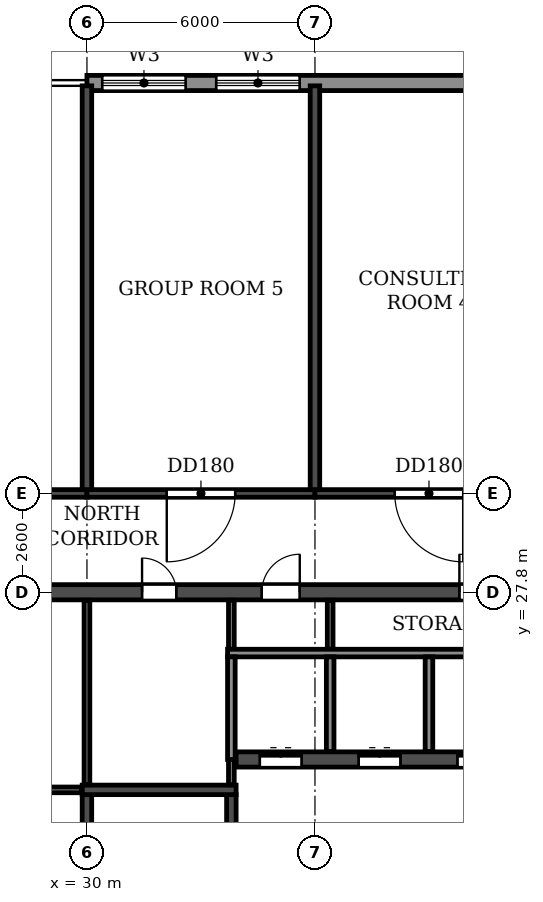
"""IFC4 building model, lengths in metres.
Left out: names, types, materials, properties, quantities, classifications, styles, units other than length and angle.
Written with IfcOpenShell. Run it as: python <this file> out.ifc"""

import sys

from ifc_helpers import new_model, si_unit, direction, frame, frame_2d, origin, place, context, subcontext, project, spatial, rectangle, extrude, element, fill, save


model = new_model("IFC4")
c1 = context("Model", 3, precision=1e-05, world=origin(), true_north=direction((0.0, 1.0)))
c2 = subcontext(c1, "Body", "Model", "MODEL_VIEW")
j1 = project(units=[si_unit("LENGTHUNIT", "METRE"), si_unit("PLANEANGLEUNIT", "RADIAN")], contexts=[c1])
p1 = place(None, origin())
s1 = spatial("IfcSite", under=j1, at=p1, CompositionType="ELEMENT")
p2 = place(p1, origin())
s2 = spatial("IfcBuilding", under=s1, at=p2, CompositionType="ELEMENT")
p3 = place(p2, frame((0.0, 0.0, 211.5)))
s3 = spatial("IfcBuildingStorey", under=s2, at=p3, CompositionType="ELEMENT", Elevation=211.5)
for number, where, z_axis, x_axis in (
    (1, (30.0, 30.5, 0.0), (0.0, 0.0, 1.0), (0.0, 1.0, 0.0)),
    (2, (36.0, 30.5, 0.0), (0.0, 0.0, 1.0), (0.0, 1.0, 0.0)),
):
    element("IfcWall", number, at=place(p3, frame(where, z_axis=z_axis, x_axis=x_axis)), inside=s3, PredefinedType="SHEAR", context=c2, shape_type="SweptSolid", body=[
        extrude(rectangle(XDim=10.625, YDim=0.25, at=frame_2d((5.312, 0.0))), origin(), (0.0, 0.0, 1.0), 2.95),
    ])
p4 = place(p3, frame((24.0, 30.4, 0.0), z_axis=(0.0, 0.0, 1.0), x_axis=(1.0, 0.0, 0.0)))
e3 = element("IfcWall", 3, at=p4, inside=s3, PredefinedType="SHEAR", context=c2, shape_type="SweptSolid", body=[
    extrude(rectangle(XDim=6.0, YDim=0.2, at=frame_2d((3.0, 0.0))), origin(), (0.0, 0.0, 1.0), 2.35),
])
p5 = place(p4, frame((2.1, 0.0, 0.0)))
e4 = element("IfcOpeningElement", 4, at=p5, cuts=e3, PredefinedType="OPENING", context=c2, shape_type="SweptSolid", body=[
    extrude(rectangle(XDim=1.8, YDim=2.1, at=frame_2d((0.9, 1.05))), frame((0.0, 0.11, 0.0), z_axis=(0.0, -1.0, 0.0), x_axis=(1.0, 0.0, 0.0)), (0.0, 0.0, 1.0), 0.22),
])
p6 = place(p3, frame((30.0, 30.4, 0.0), z_axis=(0.0, 0.0, 1.0), x_axis=(1.0, 0.0, 0.0)))
e5 = element("IfcWall", 5, at=p6, inside=s3, PredefinedType="SHEAR", context=c2, shape_type="SweptSolid", body=[
    extrude(rectangle(XDim=6.0, YDim=0.2, at=frame_2d((3.0, 0.0))), origin(), (0.0, 0.0, 1.0), 2.35),
])
p7 = place(p6, frame((2.1, 0.0, 0.0)))
e6 = element("IfcOpeningElement", 6, at=p7, cuts=e5, PredefinedType="OPENING", context=c2, shape_type="SweptSolid", body=[
    extrude(rectangle(XDim=1.8, YDim=2.1, at=frame_2d((0.9, 1.05))), frame((0.0, 0.11, 0.0), z_axis=(0.0, -1.0, 0.0), x_axis=(1.0, 0.0, 0.0)), (0.0, 0.0, 1.0), 0.22),
])
p8 = place(p3, frame((36.0, 30.4, 0.0), z_axis=(0.0, 0.0, 1.0), x_axis=(1.0, 0.0, 0.0)))
e7 = element("IfcWall", 7, at=p8, inside=s3, PredefinedType="SHEAR", context=c2, shape_type="SweptSolid", body=[
    extrude(rectangle(XDim=6.0, YDim=0.2, at=frame_2d((3.0, 0.0))), origin(), (0.0, 0.0, 1.0), 2.35),
])
p9 = place(p8, frame((2.1, 0.0, 0.0)))
e8 = element("IfcOpeningElement", 8, at=p9, cuts=e7, PredefinedType="OPENING", context=c2, shape_type="SweptSolid", body=[
    extrude(rectangle(XDim=1.8, YDim=2.1, at=frame_2d((0.9, 1.05))), frame((0.0, 0.11, 0.0), z_axis=(0.0, -1.0, 0.0), x_axis=(1.0, 0.0, 0.0)), (0.0, 0.0, 1.0), 0.22),
])
p10 = place(p3, frame((18.2, 27.8, 0.0), z_axis=(0.0, 0.0, 1.0), x_axis=(1.0, 0.0, 0.0)))
e9 = element("IfcWall", 9, at=p10, inside=s3, PredefinedType="SOLIDWALL", context=c2, shape_type="SweptSolid", body=[
    extrude(rectangle(XDim=65.6, YDim=0.4, at=frame_2d((32.8, 0.0))), origin(), (0.0, 0.0, 1.0), 2.95),
])
p11 = place(p10, frame((0.7, 0.0, 0.0)))
e10 = element("IfcOpeningElement", 10, at=p11, cuts=e9, PredefinedType="OPENING", context=c2, shape_type="SweptSolid", body=[
    extrude(rectangle(XDim=1.0, YDim=2.1, at=frame_2d((0.5, 1.05))), frame((0.0, 0.21, 0.0), z_axis=(0.0, -1.0, 0.0), x_axis=(1.0, 0.0, 0.0)), (0.0, 0.0, 1.0), 0.42),
])
p12 = place(p10, frame((4.05, 0.0, 0.0)))
e11 = element("IfcOpeningElement", 11, at=p12, cuts=e9, PredefinedType="OPENING", context=c2, shape_type="SweptSolid", body=[
    extrude(rectangle(XDim=0.9, YDim=2.1, at=frame_2d((0.45, 1.05))), frame((0.0, 0.21, 0.0), z_axis=(0.0, -1.0, 0.0), x_axis=(1.0, 0.0, 0.0)), (0.0, 0.0, 1.0), 0.42),
])
p13 = place(p10, frame((8.65, 0.0, 0.0)))
e12 = element("IfcOpeningElement", 12, at=p13, cuts=e9, PredefinedType="OPENING", context=c2, shape_type="SweptSolid", body=[
    extrude(rectangle(XDim=0.9, YDim=2.1, at=frame_2d((0.45, 1.05))), frame((0.0, 0.21, 0.0), z_axis=(0.0, -1.0, 0.0), x_axis=(1.0, 0.0, 0.0)), (0.0, 0.0, 1.0), 0.42),
])
p14 = place(p10, frame((13.25, 0.0, 0.0)))
e13 = element("IfcOpeningElement", 13, at=p14, cuts=e9, PredefinedType="OPENING", context=c2, shape_type="SweptSolid", body=[
    extrude(rectangle(XDim=0.9, YDim=2.1, at=frame_2d((0.45, 1.05))), frame((0.0, 0.21, 0.0), z_axis=(0.0, -1.0, 0.0), x_axis=(1.0, 0.0, 0.0)), (0.0, 0.0, 1.0), 0.42),
])
p15 = place(p10, frame((16.4, 0.0, 0.0)))
e14 = element("IfcOpeningElement", 14, at=p15, cuts=e9, PredefinedType="OPENING", context=c2, shape_type="SweptSolid", body=[
    extrude(rectangle(XDim=1.0, YDim=2.1, at=frame_2d((0.5, 1.05))), frame((0.0, 0.21, 0.0), z_axis=(0.0, -1.0, 0.0), x_axis=(1.0, 0.0, 0.0)), (0.0, 0.0, 1.0), 0.42),
])
p16 = place(p10, frame((21.6, 0.0, 0.0)))
e15 = element("IfcOpeningElement", 15, at=p16, cuts=e9, PredefinedType="OPENING", context=c2, shape_type="SweptSolid", body=[
    extrude(rectangle(XDim=1.0, YDim=2.1, at=frame_2d((0.5, 1.05))), frame((0.0, 0.21, 0.0), z_axis=(0.0, -1.0, 0.0), x_axis=(1.0, 0.0, 0.0)), (0.0, 0.0, 1.0), 0.42),
])
p17 = place(p10, frame((29.4, 0.0, 0.0)))
e16 = element("IfcOpeningElement", 16, at=p17, cuts=e9, PredefinedType="OPENING", context=c2, shape_type="SweptSolid", body=[
    extrude(rectangle(XDim=1.0, YDim=2.1, at=frame_2d((0.5, 1.05))), frame((0.0, 0.21, 0.0), z_axis=(0.0, -1.0, 0.0), x_axis=(1.0, 0.0, 0.0)), (0.0, 0.0, 1.0), 0.42),
])
p18 = place(p10, frame((32.3, 0.0, 0.0)))
e17 = element("IfcOpeningElement", 17, at=p18, cuts=e9, PredefinedType="OPENING", context=c2, shape_type="SweptSolid", body=[
    extrude(rectangle(XDim=1.0, YDim=2.1, at=frame_2d((0.5, 1.05))), frame((0.0, 0.21, 0.0), z_axis=(0.0, -1.0, 0.0), x_axis=(1.0, 0.0, 0.0)), (0.0, 0.0, 1.0), 0.42),
])
p19 = place(p10, frame((36.25, 0.0, 0.0)))
e18 = element("IfcOpeningElement", 18, at=p19, cuts=e9, PredefinedType="OPENING", context=c2, shape_type="SweptSolid", body=[
    extrude(rectangle(XDim=1.5, YDim=2.1, at=frame_2d((0.75, 1.05))), frame((0.0, 0.21, 0.0), z_axis=(0.0, -1.0, 0.0), x_axis=(1.0, 0.0, 0.0)), (0.0, 0.0, 1.0), 0.42),
])
p20 = place(p10, frame((41.7, 0.0, 0.0)))
e19 = element("IfcOpeningElement", 19, at=p20, cuts=e9, PredefinedType="OPENING", context=c2, shape_type="SweptSolid", body=[
    extrude(rectangle(XDim=1.0, YDim=2.1, at=frame_2d((0.5, 1.05))), frame((0.0, 0.21, 0.0), z_axis=(0.0, -1.0, 0.0), x_axis=(1.0, 0.0, 0.0)), (0.0, 0.0, 1.0), 0.42),
])
p21 = place(p10, frame((45.6, 0.0, 0.0)))
e20 = element("IfcOpeningElement", 20, at=p21, cuts=e9, PredefinedType="OPENING", context=c2, shape_type="SweptSolid", body=[
    extrude(rectangle(XDim=1.0, YDim=2.1, at=frame_2d((0.5, 1.05))), frame((0.0, 0.21, 0.0), z_axis=(0.0, -1.0, 0.0), x_axis=(1.0, 0.0, 0.0)), (0.0, 0.0, 1.0), 0.42),
])
p22 = place(p10, frame((48.2, 0.0, 0.0)))
e21 = element("IfcOpeningElement", 21, at=p22, cuts=e9, PredefinedType="OPENING", context=c2, shape_type="SweptSolid", body=[
    extrude(rectangle(XDim=1.0, YDim=2.1, at=frame_2d((0.5, 1.05))), frame((0.0, 0.21, 0.0), z_axis=(0.0, -1.0, 0.0), x_axis=(1.0, 0.0, 0.0)), (0.0, 0.0, 1.0), 0.42),
])
p23 = place(p10, frame((51.45, 0.0, 0.0)))
e22 = element("IfcOpeningElement", 22, at=p23, cuts=e9, PredefinedType="OPENING", context=c2, shape_type="SweptSolid", body=[
    extrude(rectangle(XDim=0.9, YDim=2.1, at=frame_2d((0.45, 1.05))), frame((0.0, 0.21, 0.0), z_axis=(0.0, -1.0, 0.0), x_axis=(1.0, 0.0, 0.0)), (0.0, 0.0, 1.0), 0.42),
])
p24 = place(p10, frame((56.05, 0.0, 0.0)))
e23 = element("IfcOpeningElement", 23, at=p24, cuts=e9, PredefinedType="OPENING", context=c2, shape_type="SweptSolid", body=[
    extrude(rectangle(XDim=0.9, YDim=2.1, at=frame_2d((0.45, 1.05))), frame((0.0, 0.21, 0.0), z_axis=(0.0, -1.0, 0.0), x_axis=(1.0, 0.0, 0.0)), (0.0, 0.0, 1.0), 0.42),
])
p25 = place(p10, frame((60.65, 0.0, 0.0)))
e24 = element("IfcOpeningElement", 24, at=p25, cuts=e9, PredefinedType="OPENING", context=c2, shape_type="SweptSolid", body=[
    extrude(rectangle(XDim=0.9, YDim=2.1, at=frame_2d((0.45, 1.05))), frame((0.0, 0.21, 0.0), z_axis=(0.0, -1.0, 0.0), x_axis=(1.0, 0.0, 0.0)), (0.0, 0.0, 1.0), 0.42),
])
p26 = place(p10, frame((63.9, 0.0, 0.0)))
e25 = element("IfcOpeningElement", 25, at=p26, cuts=e9, PredefinedType="OPENING", context=c2, shape_type="SweptSolid", body=[
    extrude(rectangle(XDim=1.0, YDim=2.1, at=frame_2d((0.5, 1.05))), frame((0.0, 0.21, 0.0), z_axis=(0.0, -1.0, 0.0), x_axis=(1.0, 0.0, 0.0)), (0.0, 0.0, 1.0), 0.42),
])
p27 = place(p3, frame((33.925, 23.4, 0.0), z_axis=(0.0, 0.0, 1.0), x_axis=(1.0, 0.0, 0.0)))
e26 = element("IfcWall", 26, at=p27, inside=s3, PredefinedType="SOLIDWALL", context=c2, shape_type="SweptSolid", body=[
    extrude(rectangle(XDim=34.15, YDim=0.4, at=frame_2d((17.075, 0.0))), origin(), (0.0, 0.0, 1.0), 2.95),
])
p28 = place(p27, frame((16.175, 0.0, 0.0)))
e27 = element("IfcOpeningElement", 27, at=p28, cuts=e26, PredefinedType="OPENING", context=c2, shape_type="SweptSolid", body=[
    extrude(rectangle(XDim=1.8, YDim=2.1, at=frame_2d((0.9, 1.05))), frame((0.0, 0.21, 0.0), z_axis=(0.0, -1.0, 0.0), x_axis=(1.0, 0.0, 0.0)), (0.0, 0.0, 1.0), 0.42),
])
p29 = place(p27, frame((0.625, 0.0, 0.0)))
e28 = element("IfcOpeningElement", 28, at=p29, cuts=e26, PredefinedType="OPENING", context=c2, shape_type="SweptSolid", body=[
    extrude(rectangle(XDim=1.1, YDim=2.1, at=frame_2d((0.55, 1.05))), frame((0.0, 0.21, 0.0), z_axis=(0.0, -1.0, 0.0), x_axis=(1.0, 0.0, 0.0)), (0.0, 0.0, 1.0), 0.42),
])
p30 = place(p27, frame((3.225, 0.0, 0.0)))
e29 = element("IfcOpeningElement", 29, at=p30, cuts=e26, PredefinedType="OPENING", context=c2, shape_type="SweptSolid", body=[
    extrude(rectangle(XDim=1.1, YDim=2.1, at=frame_2d((0.55, 1.05))), frame((0.0, 0.21, 0.0), z_axis=(0.0, -1.0, 0.0), x_axis=(1.0, 0.0, 0.0)), (0.0, 0.0, 1.0), 0.42),
])
p31 = place(p27, frame((5.825, 0.0, 0.0)))
e30 = element("IfcOpeningElement", 30, at=p31, cuts=e26, PredefinedType="OPENING", context=c2, shape_type="SweptSolid", body=[
    extrude(rectangle(XDim=1.1, YDim=2.1, at=frame_2d((0.55, 1.05))), frame((0.0, 0.21, 0.0), z_axis=(0.0, -1.0, 0.0), x_axis=(1.0, 0.0, 0.0)), (0.0, 0.0, 1.0), 0.42),
])
p32 = place(p27, frame((8.425, 0.0, 0.0)))
e31 = element("IfcOpeningElement", 31, at=p32, cuts=e26, PredefinedType="OPENING", context=c2, shape_type="SweptSolid", body=[
    extrude(rectangle(XDim=1.1, YDim=2.1, at=frame_2d((0.55, 1.05))), frame((0.0, 0.21, 0.0), z_axis=(0.0, -1.0, 0.0), x_axis=(1.0, 0.0, 0.0)), (0.0, 0.0, 1.0), 0.42),
])
p33 = place(p27, frame((11.025, 0.0, 0.0)))
e32 = element("IfcOpeningElement", 32, at=p33, cuts=e26, PredefinedType="OPENING", context=c2, shape_type="SweptSolid", body=[
    extrude(rectangle(XDim=1.1, YDim=2.1, at=frame_2d((0.55, 1.05))), frame((0.0, 0.21, 0.0), z_axis=(0.0, -1.0, 0.0), x_axis=(1.0, 0.0, 0.0)), (0.0, 0.0, 1.0), 0.42),
])
p34 = place(p27, frame((13.625, 0.0, 0.0)))
e33 = element("IfcOpeningElement", 33, at=p34, cuts=e26, PredefinedType="OPENING", context=c2, shape_type="SweptSolid", body=[
    extrude(rectangle(XDim=1.1, YDim=2.1, at=frame_2d((0.55, 1.05))), frame((0.0, 0.21, 0.0), z_axis=(0.0, -1.0, 0.0), x_axis=(1.0, 0.0, 0.0)), (0.0, 0.0, 1.0), 0.42),
])
p35 = place(p27, frame((27.225, 0.0, 0.0)))
e34 = element("IfcOpeningElement", 34, at=p35, cuts=e26, PredefinedType="OPENING", context=c2, shape_type="SweptSolid", body=[
    extrude(rectangle(XDim=1.1, YDim=2.1, at=frame_2d((0.55, 1.05))), frame((0.0, 0.21, 0.0), z_axis=(0.0, -1.0, 0.0), x_axis=(1.0, 0.0, 0.0)), (0.0, 0.0, 1.0), 0.42),
])
p36 = place(p3, frame((30.0, 14.8, 0.0), z_axis=(0.0, 0.0, 1.0), x_axis=(0.0, 1.0, 0.0)))
e35 = element("IfcWall", 35, at=p36, inside=s3, PredefinedType="SOLIDWALL", context=c2, shape_type="SweptSolid", body=[
    extrude(rectangle(XDim=7.675, YDim=0.25, at=frame_2d((3.837, 0.0))), origin(), (0.0, 0.0, 1.0), 2.95),
])
p37 = place(p3, frame((33.8, 14.8, 0.0), z_axis=(0.0, 0.0, 1.0), x_axis=(0.0, 1.0, 0.0)))
e36 = element("IfcWall", 36, at=p37, inside=s3, PredefinedType="SOLIDWALL", context=c2, shape_type="SweptSolid", body=[
    extrude(rectangle(XDim=7.675, YDim=0.25, at=frame_2d((3.837, 0.0))), origin(), (0.0, 0.0, 1.0), 2.95),
])
p38 = place(p37, frame((0.5, 0.0, 0.0)))
e37 = element("IfcOpeningElement", 37, at=p38, cuts=e36, PredefinedType="OPENING", context=c2, shape_type="SweptSolid", body=[
    extrude(rectangle(XDim=1.0, YDim=2.1, at=frame_2d((0.5, 1.05))), frame((0.0, 0.135, 0.0), z_axis=(0.0, -1.0, 0.0), x_axis=(1.0, 0.0, 0.0)), (0.0, 0.0, 1.0), 0.27),
])
p39 = place(p3, frame((29.875, 22.6, 0.0), z_axis=(0.0, 0.0, 1.0), x_axis=(1.0, 0.0, 0.0)))
e38 = element("IfcWall", 38, at=p39, inside=s3, PredefinedType="SOLIDWALL", context=c2, shape_type="SweptSolid", body=[
    extrude(rectangle(XDim=4.05, YDim=0.25, at=frame_2d((2.025, 0.0))), origin(), (0.0, 0.0, 1.0), 2.95),
])
p40 = place(p3, frame((66.0, 41.2, 0.0), z_axis=(0.0, 0.0, 1.0), x_axis=(-1.0, 0.0, 0.0)))
e39 = element("IfcWall", 39, at=p40, inside=s3, PredefinedType="STANDARD", context=c2, shape_type="SweptSolid", body=[
    extrude(rectangle(XDim=36.0, YDim=0.4, at=frame_2d((18.0, 0.0))), origin(), (0.0, 0.0, 1.0), 2.95),
])
p41 = place(p40, frame((33.4, 0.0, 0.6)))
e40 = element("IfcOpeningElement", 40, at=p41, cuts=e39, PredefinedType="OPENING", context=c2, shape_type="SweptSolid", body=[
    extrude(rectangle(XDim=2.2, YDim=1.8, at=frame_2d((1.1, 0.9))), frame((0.0, 0.21, 0.0), z_axis=(0.0, -1.0, 0.0), x_axis=(1.0, 0.0, 0.0)), (0.0, 0.0, 1.0), 0.42),
])
p42 = place(p40, frame((30.4, 0.0, 0.6)))
e41 = element("IfcOpeningElement", 41, at=p42, cuts=e39, PredefinedType="OPENING", context=c2, shape_type="SweptSolid", body=[
    extrude(rectangle(XDim=2.2, YDim=1.8, at=frame_2d((1.1, 0.9))), frame((0.0, 0.21, 0.0), z_axis=(0.0, -1.0, 0.0), x_axis=(1.0, 0.0, 0.0)), (0.0, 0.0, 1.0), 0.42),
])
p43 = place(p40, frame((21.4, 0.0, 0.6)))
e42 = element("IfcOpeningElement", 42, at=p43, cuts=e39, PredefinedType="OPENING", context=c2, shape_type="SweptSolid", body=[
    extrude(rectangle(XDim=2.2, YDim=1.8, at=frame_2d((1.1, 0.9))), frame((0.0, 0.21, 0.0), z_axis=(0.0, -1.0, 0.0), x_axis=(1.0, 0.0, 0.0)), (0.0, 0.0, 1.0), 0.42),
])
p44 = place(p40, frame((18.4, 0.0, 0.6)))
e43 = element("IfcOpeningElement", 43, at=p44, cuts=e39, PredefinedType="OPENING", context=c2, shape_type="SweptSolid", body=[
    extrude(rectangle(XDim=2.2, YDim=1.8, at=frame_2d((1.1, 0.9))), frame((0.0, 0.21, 0.0), z_axis=(0.0, -1.0, 0.0), x_axis=(1.0, 0.0, 0.0)), (0.0, 0.0, 1.0), 0.42),
])
p45 = place(p3, frame((24.735, 22.6, 0.0), z_axis=(0.0, 0.0, 1.0), x_axis=(1.0, 0.0, 0.0)))
e44 = element("IfcWall", 44, at=p45, inside=s3, PredefinedType="PARTITIONING", context=c2, shape_type="SweptSolid", body=[
    extrude(rectangle(XDim=5.13, YDim=0.15, at=frame_2d((2.565, 0.0))), origin(), (0.0, 0.0, 1.0), 2.95),
])
p46 = place(p3, frame((36.4, 26.3, 0.0), z_axis=(0.0, 0.0, 1.0), x_axis=(0.0, 1.0, 0.0)))
e45 = element("IfcWall", 45, at=p46, inside=s3, PredefinedType="PARTITIONING", context=c2, shape_type="SweptSolid", body=[
    extrude(rectangle(XDim=1.29, YDim=0.15, at=frame_2d((0.645, 0.0))), origin(), (0.0, 0.0, 1.0), 2.95),
])
p47 = place(p3, frame((30.0, 22.735, 0.0), z_axis=(0.0, 0.0, 1.0), x_axis=(0.0, 1.0, 0.0)))
e46 = element("IfcWall", 46, at=p47, inside=s3, PredefinedType="PARTITIONING", context=c2, shape_type="SweptSolid", body=[
    extrude(rectangle(XDim=4.855, YDim=0.15, at=frame_2d((2.427, 0.0))), origin(), (0.0, 0.0, 1.0), 2.95),
])
p48 = place(p3, frame((33.8, 22.735, 0.0), z_axis=(0.0, 0.0, 1.0), x_axis=(0.0, 1.0, 0.0)))
e47 = element("IfcWall", 47, at=p48, inside=s3, PredefinedType="PARTITIONING", context=c2, shape_type="SweptSolid", body=[
    extrude(rectangle(XDim=0.665, YDim=0.15, at=frame_2d((0.333, 0.0))), origin(), (0.0, 0.0, 1.0), 2.95),
])
p49 = place(p3, frame((33.8, 26.3, 0.0), z_axis=(0.0, 0.0, 1.0), x_axis=(0.0, 1.0, 0.0)))
e48 = element("IfcWall", 48, at=p49, inside=s3, PredefinedType="PARTITIONING", context=c2, shape_type="SweptSolid", body=[
    extrude(rectangle(XDim=1.29, YDim=0.15, at=frame_2d((0.645, 0.0))), origin(), (0.0, 0.0, 1.0), 2.95),
])
p50 = place(p3, frame((33.7, 26.2, 0.0), z_axis=(0.0, 0.0, 1.0), x_axis=(1.0, 0.0, 0.0)))
e49 = element("IfcWall", 49, at=p50, inside=s3, PredefinedType="PARTITIONING", context=c2, shape_type="SweptSolid", body=[
    extrude(rectangle(XDim=10.4, YDim=0.2, at=frame_2d((5.2, 0.0))), origin(), (0.0, 0.0, 1.0), 2.95),
])
p51 = place(p3, frame((33.8, 23.4, 0.0), z_axis=(0.0, 0.0, 1.0), x_axis=(0.0, 1.0, 0.0)))
e50 = element("IfcWall", 50, at=p51, inside=s3, PredefinedType="PARTITIONING", context=c2, shape_type="SweptSolid", body=[
    extrude(rectangle(XDim=2.7, YDim=0.2, at=frame_2d((1.35, 0.0))), origin(), (0.0, 0.0, 1.0), 2.95),
])
for number, where, z_axis, x_axis in (
    (51, (36.4, 23.61, 0.0), (0.0, 0.0, 1.0), (0.0, 1.0, 0.0)),
    (52, (39.0, 23.61, 0.0), (0.0, 0.0, 1.0), (0.0, 1.0, 0.0)),
):
    element("IfcWall", number, at=place(p3, frame(where, z_axis=z_axis, x_axis=x_axis)), inside=s3, PredefinedType="PARTITIONING", context=c2, shape_type="SweptSolid", body=[
        extrude(rectangle(XDim=2.49, YDim=0.2, at=frame_2d((1.245, 0.0))), origin(), (0.0, 0.0, 1.0), 2.95),
    ])
p52 = place(p41, origin())
e53 = element("IfcWindow", 53, at=p52, inside=s3, PartitioningType="DOUBLE_PANEL_HORIZONTAL", PredefinedType="WINDOW", context=c2, shape_type="SweptSolid", body=[
    extrude(rectangle(XDim=2.2, YDim=1.8, at=frame_2d((1.1, 0.9))), frame((0.0, 0.03, 0.0), z_axis=(0.0, -1.0, 0.0), x_axis=(1.0, 0.0, 0.0)), (0.0, 0.0, 1.0), 0.06),
])
fill(e40, e53)
p53 = place(p42, origin())
e54 = element("IfcWindow", 54, at=p53, inside=s3, PartitioningType="DOUBLE_PANEL_HORIZONTAL", PredefinedType="WINDOW", context=c2, shape_type="SweptSolid", body=[
    extrude(rectangle(XDim=2.2, YDim=1.8, at=frame_2d((1.1, 0.9))), frame((0.0, 0.03, 0.0), z_axis=(0.0, -1.0, 0.0), x_axis=(1.0, 0.0, 0.0)), (0.0, 0.0, 1.0), 0.06),
])
fill(e41, e54)
p54 = place(p14, origin())
e55 = element("IfcDoor", 55, at=p54, inside=s3, OperationType="SINGLE_SWING_LEFT", PredefinedType="DOOR", context=c2, shape_type="SweptSolid", body=[
    extrude(rectangle(XDim=0.9, YDim=2.1, at=frame_2d((0.45, 1.05))), frame((0.0, 0.025, 0.0), z_axis=(0.0, -1.0, 0.0), x_axis=(1.0, 0.0, 0.0)), (0.0, 0.0, 1.0), 0.05),
])
fill(e13, e55)
p55 = place(p7, frame((1.8, 0.0, 0.0), z_axis=(0.0, 0.0, 1.0), x_axis=(-1.0, 0.0, 0.0)))
e56 = element("IfcDoor", 56, at=p55, inside=s3, OperationType="DOUBLE_DOOR_SINGLE_SWING", PredefinedType="DOOR", context=c2, shape_type="SweptSolid", body=[
    extrude(rectangle(XDim=1.8, YDim=2.1, at=frame_2d((0.9, 1.05))), frame((0.0, 0.025, 0.0), z_axis=(0.0, -1.0, 0.0), x_axis=(1.0, 0.0, 0.0)), (0.0, 0.0, 1.0), 0.05),
])
fill(e6, e56)
p56 = place(p15, origin())
e57 = element("IfcDoor", 57, at=p56, inside=s3, OperationType="SINGLE_SWING_RIGHT", PredefinedType="DOOR", context=c2, shape_type="SweptSolid", body=[
    extrude(rectangle(XDim=1.0, YDim=2.1, at=frame_2d((0.5, 1.05))), frame((0.0, 0.025, 0.0), z_axis=(0.0, -1.0, 0.0), x_axis=(1.0, 0.0, 0.0)), (0.0, 0.0, 1.0), 0.05),
])
fill(e14, e57)
p57 = place(p9, frame((1.8, 0.0, 0.0), z_axis=(0.0, 0.0, 1.0), x_axis=(-1.0, 0.0, 0.0)))
e58 = element("IfcDoor", 58, at=p57, inside=s3, OperationType="DOUBLE_DOOR_SINGLE_SWING", PredefinedType="DOOR", context=c2, shape_type="SweptSolid", body=[
    extrude(rectangle(XDim=1.8, YDim=2.1, at=frame_2d((0.9, 1.05))), frame((0.0, 0.025, 0.0), z_axis=(0.0, -1.0, 0.0), x_axis=(1.0, 0.0, 0.0)), (0.0, 0.0, 1.0), 0.05),
])
fill(e8, e58)
p58 = place(p16, origin())
e59 = element("IfcDoor", 59, at=p58, inside=s3, OperationType="SINGLE_SWING_LEFT", PredefinedType="DOOR", context=c2, shape_type="SweptSolid", body=[
    extrude(rectangle(XDim=1.0, YDim=2.1, at=frame_2d((0.5, 1.05))), frame((0.0, 0.025, 0.0), z_axis=(0.0, -1.0, 0.0), x_axis=(1.0, 0.0, 0.0)), (0.0, 0.0, 1.0), 0.05),
])
fill(e15, e59)
p59 = place(p29, origin())
e60 = element("IfcDoor", 60, at=p59, inside=s3, OperationType="DOUBLE_DOOR_SLIDING", PredefinedType="DOOR", context=c2, shape_type="SweptSolid", body=[
    extrude(rectangle(XDim=1.1, YDim=2.1, at=frame_2d((0.55, 1.05))), frame((0.0, 0.025, 0.0), z_axis=(0.0, -1.0, 0.0), x_axis=(1.0, 0.0, 0.0)), (0.0, 0.0, 1.0), 0.05),
])
fill(e28, e60)
p60 = place(p30, origin())
e61 = element("IfcDoor", 61, at=p60, inside=s3, OperationType="DOUBLE_DOOR_SLIDING", PredefinedType="DOOR", context=c2, shape_type="SweptSolid", body=[
    extrude(rectangle(XDim=1.1, YDim=2.1, at=frame_2d((0.55, 1.05))), frame((0.0, 0.025, 0.0), z_axis=(0.0, -1.0, 0.0), x_axis=(1.0, 0.0, 0.0)), (0.0, 0.0, 1.0), 0.05),
])
fill(e29, e61)
p61 = place(p31, origin())
e62 = element("IfcDoor", 62, at=p61, inside=s3, OperationType="DOUBLE_DOOR_SLIDING", PredefinedType="DOOR", context=c2, shape_type="SweptSolid", body=[
    extrude(rectangle(XDim=1.1, YDim=2.1, at=frame_2d((0.55, 1.05))), frame((0.0, 0.025, 0.0), z_axis=(0.0, -1.0, 0.0), x_axis=(1.0, 0.0, 0.0)), (0.0, 0.0, 1.0), 0.05),
])
fill(e30, e62)
save(model, sys.argv[1])
